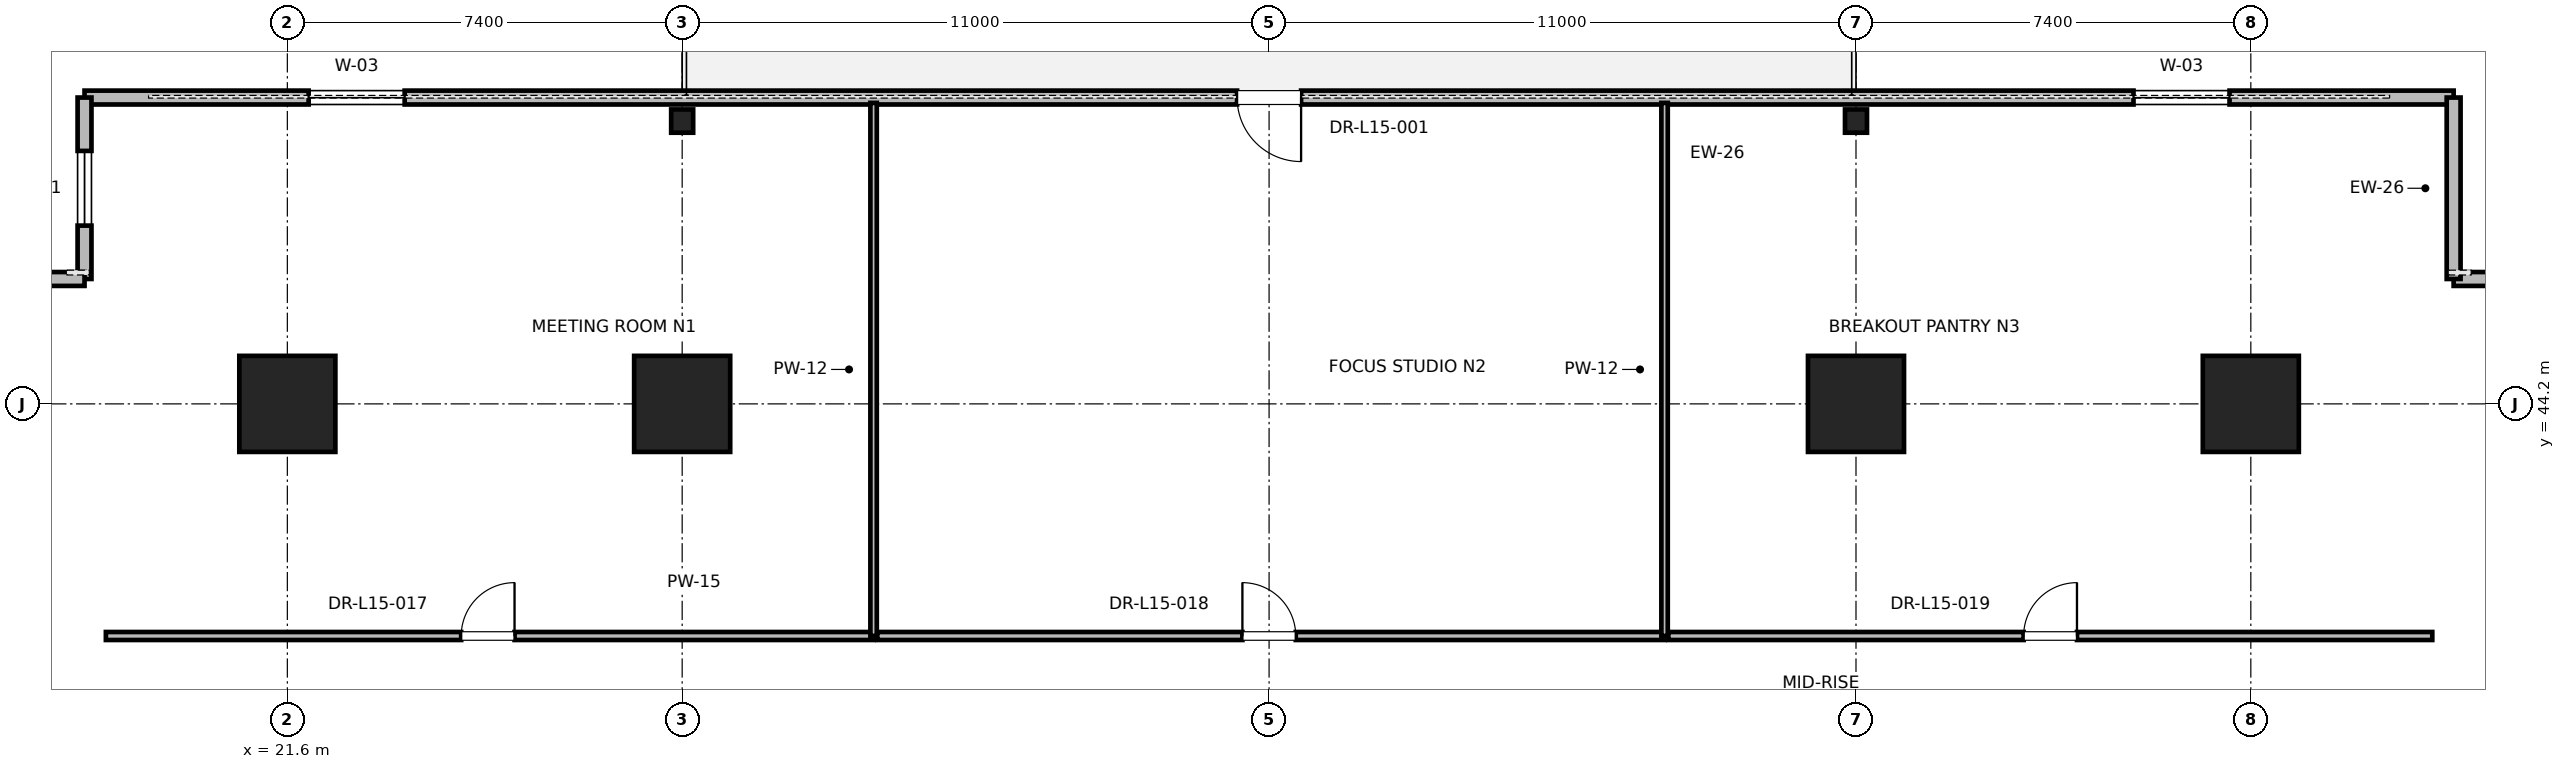
"""IFC4 building model, lengths in metres.
Left out: names, types, materials, properties, quantities, classifications, styles, units other than length and angle.
Written with IfcOpenShell. Run it as: python <this file> out.ifc"""

import sys

from ifc_helpers import new_model, si_unit, direction, frame, frame_2d, origin, origin_2d, place, context, subcontext, project, spatial, rectangle, i_section, extrude, element, fill, save


model = new_model("IFC4")
c1 = context("Model", 3, precision=1e-05, world=origin(), true_north=direction((0.0, 1.0)))
c2 = subcontext(c1, "Body", "Model", "MODEL_VIEW")
j1 = project(units=[si_unit("LENGTHUNIT", "METRE"), si_unit("PLANEANGLEUNIT", "RADIAN")], contexts=[c1])
p1 = place(None, origin())
s1 = spatial("IfcSite", under=j1, at=p1, CompositionType="ELEMENT")
p2 = place(p1, origin())
s2 = spatial("IfcBuilding", under=s1, at=p2, CompositionType="ELEMENT")
p3 = place(p2, frame((0.0, 0.0, 67.6)))
s3 = spatial("IfcBuildingStorey", under=s2, at=p3, CompositionType="ELEMENT", Elevation=67.6)
for number, where, z_axis, x_axis in (
    (1, (29.0, 44.2, 0.0), (0.0, 0.0, 1.0), (1.0, 0.0, 0.0)),
    (2, (51.0, 44.2, 0.0), (0.0, 0.0, 1.0), (1.0, 0.0, 0.0)),
    (3, (21.6, 44.2, 0.0), (0.0, 0.0, 1.0), (1.0, 0.0, 0.0)),
    (4, (58.4, 44.2, 0.0), (0.0, 0.0, 1.0), (1.0, 0.0, 0.0)),
):
    element("IfcColumn", number, at=place(p3, frame(where, z_axis=z_axis, x_axis=x_axis)), inside=s3, PredefinedType="COLUMN", context=c2, shape_type="SweptSolid", body=[
        extrude(rectangle(XDim=1.8, YDim=1.8, at=origin_2d()), origin(), (0.0, 0.0, 1.0), 4.0),
    ])
for number, where, z_axis, x_axis in (
    (5, (29.0, 49.5, 0.0), (0.0, 0.0, 1.0), (1.0, 0.0, 0.0)),
    (6, (51.0, 49.5, 0.0), (0.0, 0.0, 1.0), (1.0, 0.0, 0.0)),
):
    element("IfcColumn", number, at=place(p3, frame(where, z_axis=z_axis, x_axis=x_axis)), inside=s3, PredefinedType="COLUMN", context=c2, shape_type="SweptSolid", body=[
        extrude(i_section(OverallWidth=0.412, OverallDepth=0.437, WebThickness=0.036, FlangeThickness=0.058, FilletRadius=0.015, at=origin_2d()), origin(), (0.0, 0.0, 1.0), 4.0),
    ])
p4 = place(p3, frame((62.201, 49.941, 0.0), z_axis=(0.0, 0.0, 1.0), x_axis=(-1.0, 0.0, 0.0)))
e7 = element("IfcWall", 7, at=p4, inside=s3, PredefinedType="PARAPET", context=c2, shape_type="SweptSolid", body=[
    extrude(rectangle(XDim=44.402, YDim=0.26, at=frame_2d((22.201, 0.0))), origin(), (0.0, 0.0, 1.0), 2.889),
])
p5 = place(p4, frame((4.2, 0.0, 0.85)))
e8 = element("IfcOpeningElement", 8, at=p5, cuts=e7, PredefinedType="OPENING", context=c2, shape_type="SweptSolid", body=[
    extrude(rectangle(XDim=1.8, YDim=2.2, at=frame_2d((0.9, 1.1))), frame((0.0, 0.13, 0.0), z_axis=(0.0, -1.0, 0.0), x_axis=(1.0, 0.0, 0.0)), (0.0, 0.0, 1.0), 0.26),
])
p6 = place(p4, frame((21.601, 0.0, 0.0)))
e9 = element("IfcOpeningElement", 9, at=p6, cuts=e7, PredefinedType="OPENING", context=c2, shape_type="SweptSolid", body=[
    extrude(rectangle(XDim=1.2, YDim=2.2, at=frame_2d((0.6, 1.1))), frame((0.0, 0.13, 0.0), z_axis=(0.0, -1.0, 0.0), x_axis=(1.0, 0.0, 0.0)), (0.0, 0.0, 1.0), 0.26),
])
p7 = place(p4, frame((38.402, 0.0, 0.85)))
e10 = element("IfcOpeningElement", 10, at=p7, cuts=e7, PredefinedType="OPENING", context=c2, shape_type="SweptSolid", body=[
    extrude(rectangle(XDim=1.8, YDim=2.2, at=frame_2d((0.9, 1.1))), frame((0.0, 0.13, 0.0), z_axis=(0.0, -1.0, 0.0), x_axis=(1.0, 0.0, 0.0)), (0.0, 0.0, 1.0), 0.26),
])
p8 = place(p3, frame((66.001, 46.541, 0.0), z_axis=(0.0, 0.0, 1.0), x_axis=(-1.0, 0.0, 0.0)))
e11 = element("IfcWall", 11, at=p8, inside=s3, PredefinedType="PARAPET", context=c2, shape_type="SweptSolid", body=[
    extrude(rectangle(XDim=3.8, YDim=0.26, at=frame_2d((1.9, 0.0))), origin(), (0.0, 0.0, 1.0), 3.76),
])
p9 = place(p8, frame((1.2, 0.0, 0.85)))
e12 = element("IfcOpeningElement", 12, at=p9, cuts=e11, PredefinedType="OPENING", context=c2, shape_type="SweptSolid", body=[
    extrude(rectangle(XDim=1.4, YDim=2.0, at=frame_2d((0.7, 1.0))), frame((0.0, 0.13, 0.0), z_axis=(0.0, -1.0, 0.0), x_axis=(1.0, 0.0, 0.0)), (0.0, 0.0, 1.0), 0.26),
])
p10 = place(p3, frame((62.201, 46.541, 0.0), z_axis=(0.0, 0.0, 1.0), x_axis=(0.0, 1.0, 0.0)))
e13 = element("IfcWall", 13, at=p10, inside=s3, PredefinedType="PARAPET", context=c2, shape_type="SweptSolid", body=[
    extrude(rectangle(XDim=3.4, YDim=0.26, at=frame_2d((1.7, 0.0))), origin(), (0.0, 0.0, 1.0), 3.76),
])
p11 = place(p3, frame((17.799, 49.941, 0.0), z_axis=(0.0, 0.0, 1.0), x_axis=(0.0, -1.0, 0.0)))
e14 = element("IfcWall", 14, at=p11, inside=s3, PredefinedType="PARAPET", context=c2, shape_type="SweptSolid", body=[
    extrude(rectangle(XDim=3.4, YDim=0.26, at=frame_2d((1.7, 0.0))), origin(), (0.0, 0.0, 1.0), 3.76),
])
p12 = place(p11, frame((1.0, 0.0, 0.85)))
e15 = element("IfcOpeningElement", 15, at=p12, cuts=e14, PredefinedType="OPENING", context=c2, shape_type="SweptSolid", body=[
    extrude(rectangle(XDim=1.4, YDim=2.0, at=frame_2d((0.7, 1.0))), frame((0.0, 0.13, 0.0), z_axis=(0.0, -1.0, 0.0), x_axis=(1.0, 0.0, 0.0)), (0.0, 0.0, 1.0), 0.26),
])
p13 = place(p3, frame((17.799, 46.541, 0.0), z_axis=(0.0, 0.0, 1.0), x_axis=(-1.0, 0.0, 0.0)))
e16 = element("IfcWall", 16, at=p13, inside=s3, PredefinedType="PARAPET", context=c2, shape_type="SweptSolid", body=[
    extrude(rectangle(XDim=3.8, YDim=0.26, at=frame_2d((1.9, 0.0))), origin(), (0.0, 0.0, 1.0), 3.76),
])
p14 = place(p3, frame((18.199, 39.85, 0.0), z_axis=(0.0, 0.0, 1.0), x_axis=(1.0, 0.0, 0.0)))
e17 = element("IfcWall", 17, at=p14, inside=s3, PredefinedType="PARTITIONING", context=c2, shape_type="SweptSolid", body=[
    extrude(rectangle(XDim=14.389, YDim=0.15, at=frame_2d((7.194, 0.0))), origin(), (0.0, 0.0, 1.0), 2.85),
])
p15 = place(p14, frame((6.659, 0.0, 0.0)))
e18 = element("IfcOpeningElement", 18, at=p15, cuts=e17, PredefinedType="OPENING", context=c2, shape_type="SweptSolid", body=[
    extrude(rectangle(XDim=1.0, YDim=2.15, at=frame_2d((0.5, 1.075))), frame((0.0, 0.075, 0.0), z_axis=(0.0, -1.0, 0.0), x_axis=(1.0, 0.0, 0.0)), (0.0, 0.0, 1.0), 0.15),
])
p16 = place(p3, frame((32.588, 39.85, 0.0), z_axis=(0.0, 0.0, 1.0), x_axis=(0.0, 1.0, 0.0)))
e19 = element("IfcWall", 19, at=p16, inside=s3, PredefinedType="PARTITIONING", context=c2, shape_type="SweptSolid", body=[
    extrude(rectangle(XDim=9.991, YDim=0.12, at=frame_2d((4.995, 0.0))), origin(), (0.0, 0.0, 1.0), 2.39),
])
p17 = place(p3, frame((32.658, 39.85, 0.0), z_axis=(0.0, 0.0, 1.0), x_axis=(1.0, 0.0, 0.0)))
e20 = element("IfcWall", 20, at=p17, inside=s3, PredefinedType="PARTITIONING", context=c2, shape_type="SweptSolid", body=[
    extrude(rectangle(XDim=14.755, YDim=0.15, at=frame_2d((7.377, 0.0))), origin(), (0.0, 0.0, 1.0), 2.85),
])
p18 = place(p17, frame((6.842, 0.0, 0.0)))
e21 = element("IfcOpeningElement", 21, at=p18, cuts=e20, PredefinedType="OPENING", context=c2, shape_type="SweptSolid", body=[
    extrude(rectangle(XDim=1.0, YDim=2.15, at=frame_2d((0.5, 1.075))), frame((0.0, 0.075, 0.0), z_axis=(0.0, -1.0, 0.0), x_axis=(1.0, 0.0, 0.0)), (0.0, 0.0, 1.0), 0.15),
])
p19 = place(p3, frame((47.412, 39.85, 0.0), z_axis=(0.0, 0.0, 1.0), x_axis=(0.0, 1.0, 0.0)))
e22 = element("IfcWall", 22, at=p19, inside=s3, PredefinedType="PARTITIONING", context=c2, shape_type="SweptSolid", body=[
    extrude(rectangle(XDim=9.991, YDim=0.12, at=frame_2d((4.995, 0.0))), origin(), (0.0, 0.0, 1.0), 2.39),
])
p20 = place(p3, frame((47.482, 39.85, 0.0), z_axis=(0.0, 0.0, 1.0), x_axis=(1.0, 0.0, 0.0)))
e23 = element("IfcWall", 23, at=p20, inside=s3, PredefinedType="PARTITIONING", context=c2, shape_type="SweptSolid", body=[
    extrude(rectangle(XDim=14.319, YDim=0.15, at=frame_2d((7.159, 0.0))), origin(), (0.0, 0.0, 1.0), 2.85),
])
p21 = place(p20, frame((6.659, 0.0, 0.0)))
e24 = element("IfcOpeningElement", 24, at=p21, cuts=e23, PredefinedType="OPENING", context=c2, shape_type="SweptSolid", body=[
    extrude(rectangle(XDim=1.0, YDim=2.15, at=frame_2d((0.5, 1.075))), frame((0.0, 0.075, 0.0), z_axis=(0.0, -1.0, 0.0), x_axis=(1.0, 0.0, 0.0)), (0.0, 0.0, 1.0), 0.15),
])
p22 = place(p5, origin())
e25 = element("IfcWindow", 25, at=p22, inside=s3, PartitioningType="SINGLE_PANEL", PredefinedType="WINDOW", context=c2, shape_type="SweptSolid", body=[
    extrude(rectangle(XDim=1.8, YDim=2.2, at=frame_2d((0.9, 1.1))), frame((0.0, 0.03, 0.0), z_axis=(0.0, -1.0, 0.0), x_axis=(1.0, 0.0, 0.0)), (0.0, 0.0, 1.0), 0.06),
])
fill(e8, e25)
p23 = place(p6, origin())
e26 = element("IfcDoor", 26, at=p23, inside=s3, OperationType="SINGLE_SWING_LEFT", PredefinedType="DOOR", context=c2, shape_type="SweptSolid", body=[
    extrude(rectangle(XDim=1.2, YDim=2.2, at=frame_2d((0.6, 1.1))), frame((0.0, 0.025, 0.0), z_axis=(0.0, -1.0, 0.0), x_axis=(1.0, 0.0, 0.0)), (0.0, 0.0, 1.0), 0.05),
])
fill(e9, e26)
p24 = place(p7, origin())
e27 = element("IfcWindow", 27, at=p24, inside=s3, PartitioningType="SINGLE_PANEL", PredefinedType="WINDOW", context=c2, shape_type="SweptSolid", body=[
    extrude(rectangle(XDim=1.8, YDim=2.2, at=frame_2d((0.9, 1.1))), frame((0.0, 0.03, 0.0), z_axis=(0.0, -1.0, 0.0), x_axis=(1.0, 0.0, 0.0)), (0.0, 0.0, 1.0), 0.06),
])
fill(e10, e27)
p25 = place(p12, origin())
e28 = element("IfcWindow", 28, at=p25, inside=s3, PartitioningType="SINGLE_PANEL", PredefinedType="WINDOW", context=c2, shape_type="SweptSolid", body=[
    extrude(rectangle(XDim=1.4, YDim=2.0, at=frame_2d((0.7, 1.0))), frame((0.0, 0.03, 0.0), z_axis=(0.0, -1.0, 0.0), x_axis=(1.0, 0.0, 0.0)), (0.0, 0.0, 1.0), 0.06),
])
fill(e15, e28)
p26 = place(p15, origin())
e29 = element("IfcDoor", 29, at=p26, inside=s3, OperationType="SINGLE_SWING_RIGHT", PredefinedType="DOOR", context=c2, shape_type="SweptSolid", body=[
    extrude(rectangle(XDim=1.0, YDim=2.15, at=frame_2d((0.5, 1.075))), frame((0.0, 0.025, 0.0), z_axis=(0.0, -1.0, 0.0), x_axis=(1.0, 0.0, 0.0)), (0.0, 0.0, 1.0), 0.05),
])
fill(e18, e29)
p27 = place(p18, origin())
e30 = element("IfcDoor", 30, at=p27, inside=s3, OperationType="SINGLE_SWING_LEFT", PredefinedType="DOOR", context=c2, shape_type="SweptSolid", body=[
    extrude(rectangle(XDim=1.0, YDim=2.15, at=frame_2d((0.5, 1.075))), frame((0.0, 0.025, 0.0), z_axis=(0.0, -1.0, 0.0), x_axis=(1.0, 0.0, 0.0)), (0.0, 0.0, 1.0), 0.05),
])
fill(e21, e30)
p28 = place(p21, origin())
e31 = element("IfcDoor", 31, at=p28, inside=s3, OperationType="SINGLE_SWING_RIGHT", PredefinedType="DOOR", context=c2, shape_type="SweptSolid", body=[
    extrude(rectangle(XDim=1.0, YDim=2.15, at=frame_2d((0.5, 1.075))), frame((0.0, 0.025, 0.0), z_axis=(0.0, -1.0, 0.0), x_axis=(1.0, 0.0, 0.0)), (0.0, 0.0, 1.0), 0.05),
])
fill(e24, e31)
save(model, sys.argv[1])
